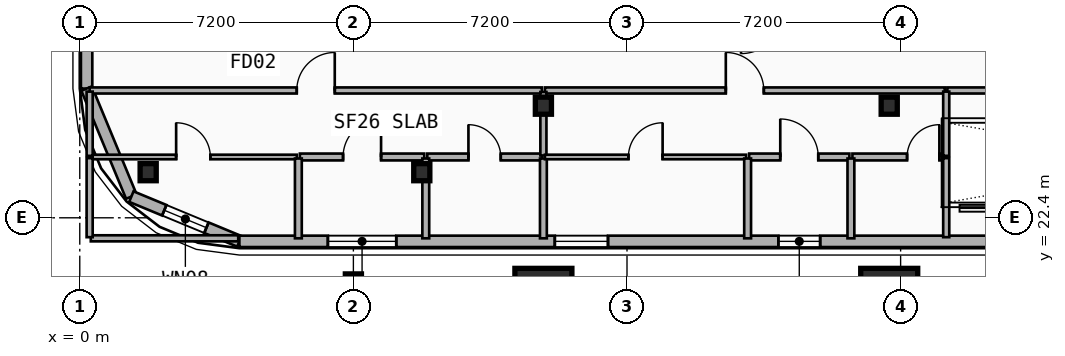
"""IFC4 building model, lengths in metres.
Left out: names, types, materials, properties, quantities, classifications, styles, units other than length and angle.
Written with IfcOpenShell. Run it as: python <this file> out.ifc"""

import sys

from ifc_helpers import new_model, si_unit, direction, frame, frame_2d, origin, origin_2d, place, context, subcontext, project, spatial, rectangle, i_section, extrude, element, fill, save


model = new_model("IFC4")
c1 = context("Model", 3, precision=1e-05, world=origin(), true_north=direction((0.0, 1.0)))
c2 = subcontext(c1, "Body", "Model", "MODEL_VIEW")
j1 = project(units=[si_unit("LENGTHUNIT", "METRE"), si_unit("PLANEANGLEUNIT", "RADIAN")], contexts=[c1])
p1 = place(None, origin())
s1 = spatial("IfcSite", under=j1, at=p1, CompositionType="ELEMENT")
p2 = place(p1, origin())
s2 = spatial("IfcBuilding", under=s1, at=p2, CompositionType="ELEMENT")
p3 = place(p2, frame((0.0, 0.0, 64.0)))
s3 = spatial("IfcBuildingStorey", under=s2, at=p3, CompositionType="ELEMENT", Elevation=64.0)
for number, where, z_axis, x_axis in (
    (1, (12.2, 25.35, 0.0), (0.0, 0.0, 1.0), (1.0, 0.0, 0.0)),
    (2, (21.3, 25.35, 0.0), (0.0, 0.0, 1.0), (1.0, 0.0, 0.0)),
):
    element("IfcColumn", number, at=place(p3, frame(where, z_axis=z_axis, x_axis=x_axis)), inside=s3, PredefinedType="COLUMN", context=c2, shape_type="SweptSolid", body=[
        extrude(i_section(OverallWidth=0.424, OverallDepth=0.45, WebThickness=0.041, FlangeThickness=0.065, FilletRadius=0.015, at=origin_2d()), origin(), (0.0, 0.0, 1.0), 3.5),
    ])
for number, where, z_axis, x_axis in (
    (3, (12.2, 20.428, 0.0), (0.0, -0.09, 0.996), (1.0, 0.0, 0.0)),
    (4, (21.3, 20.428, 0.0), (0.0, -0.09, 0.996), (1.0, 0.0, 0.0)),
):
    element("IfcColumn", number, at=place(p3, frame(where, z_axis=z_axis, x_axis=x_axis)), inside=s3, PredefinedType="COLUMN", context=c2, shape_type="SweptSolid", body=[
        extrude(rectangle(XDim=1.5, YDim=1.5, at=origin_2d()), origin(), (0.0, 0.0, 1.0), 3.514),
    ])
for number, where, z_axis, x_axis in (
    (5, (9.0, 23.6, 0.0), (0.0, 0.0, 1.0), (1.0, 0.0, 0.0)),
    (6, (1.8, 23.6, 0.0), (0.0, 0.0, 1.0), (1.0, 0.0, 0.0)),
):
    element("IfcColumn", number, at=place(p3, frame(where, z_axis=z_axis, x_axis=x_axis)), inside=s3, PredefinedType="COLUMN", context=c2, shape_type="SweptSolid", body=[
        extrude(i_section(OverallWidth=0.424, OverallDepth=0.45, WebThickness=0.041, FlangeThickness=0.065, FilletRadius=0.015, at=origin_2d()), origin(), (0.0, 0.0, 1.0), 3.5),
    ])
p4 = place(p3, frame((7.2, 20.795, 0.0), z_axis=(0.0, -0.079891690793, 0.996803550226), x_axis=(1.0, 0.0, 0.0)))
e7 = element("IfcColumn", 7, at=p4, inside=s3, PredefinedType="COLUMN", context=c2, shape_type="SweptSolid", body=[
    extrude(i_section(OverallWidth=0.424, OverallDepth=0.45, WebThickness=0.041, FlangeThickness=0.065, FilletRadius=0.015, at=origin_2d()), origin(), (0.0, 0.0, 1.0), 3.511),
])
p5 = place(p3, frame((0.18, 25.8, 0.0), z_axis=(0.0, 0.0, 1.0), x_axis=(0.0, 1.0, 0.0)))
e8 = element("IfcWall", 8, at=p5, inside=s3, PredefinedType="SOLIDWALL", context=c2, shape_type="SweptSolid", body=[
    extrude(rectangle(XDim=15.2, YDim=0.3, at=frame_2d((7.6, 0.0))), origin(), (0.0, 0.0, 1.0), 3.24),
])
p6 = place(p5, frame((2.86, 0.0, 0.48)))
e9 = element("IfcOpeningElement", 9, at=p6, cuts=e8, PredefinedType="OPENING", context=c2, shape_type="SweptSolid", body=[
    extrude(rectangle(XDim=1.4, YDim=1.8, at=frame_2d((0.7, 0.9))), frame((0.0, 0.16, 0.0), z_axis=(0.0, -1.0, 0.0), x_axis=(1.0, 0.0, 0.0)), (0.0, 0.0, 1.0), 0.32),
])
p7 = place(p5, frame((5.019, 0.0, 0.48)))
e10 = element("IfcOpeningElement", 10, at=p7, cuts=e8, PredefinedType="OPENING", context=c2, shape_type="SweptSolid", body=[
    extrude(rectangle(XDim=1.4, YDim=1.8, at=frame_2d((0.7, 0.9))), frame((0.0, 0.16, 0.0), z_axis=(0.0, -1.0, 0.0), x_axis=(1.0, 0.0, 0.0)), (0.0, 0.0, 1.0), 0.32),
])
p8 = place(p5, frame((8.186, 0.0, 0.48)))
e11 = element("IfcOpeningElement", 11, at=p8, cuts=e8, PredefinedType="OPENING", context=c2, shape_type="SweptSolid", body=[
    extrude(rectangle(XDim=1.4, YDim=1.8, at=frame_2d((0.7, 0.9))), frame((0.0, 0.16, 0.0), z_axis=(0.0, -1.0, 0.0), x_axis=(1.0, 0.0, 0.0)), (0.0, 0.0, 1.0), 0.32),
])
p9 = place(p5, frame((9.993, 0.0, 0.48)))
e12 = element("IfcOpeningElement", 12, at=p9, cuts=e8, PredefinedType="OPENING", context=c2, shape_type="SweptSolid", body=[
    extrude(rectangle(XDim=1.4, YDim=1.8, at=frame_2d((0.7, 0.9))), frame((0.0, 0.16, 0.0), z_axis=(0.0, -1.0, 0.0), x_axis=(1.0, 0.0, 0.0)), (0.0, 0.0, 1.0), 0.32),
])
p10 = place(p3, frame((1.357, 22.958, 0.0), z_axis=(0.0, 0.0, 1.0), x_axis=(-0.382704529509, 0.923870793506, 0.0)))
e13 = element("IfcWall", 13, at=p10, inside=s3, PredefinedType="SOLIDWALL", context=c2, shape_type="SweptSolid", body=[
    extrude(rectangle(XDim=3.077, YDim=0.3, at=frame_2d((1.538, 0.0))), origin(), (0.0, 0.0, 1.0), 3.24),
])
p11 = place(p3, frame((4.2, 21.78, 0.0), z_axis=(0.0, 0.0, 1.0), x_axis=(-0.923870793506, 0.382704529509, 0.0)))
e14 = element("IfcWall", 14, at=p11, inside=s3, PredefinedType="SOLIDWALL", context=c2, shape_type="SweptSolid", body=[
    extrude(rectangle(XDim=3.077, YDim=0.3, at=frame_2d((1.538, 0.0))), origin(), (0.0, 0.0, 1.0), 3.24),
])
p12 = place(p11, frame((0.938, 0.0, 0.75)))
e15 = element("IfcOpeningElement", 15, at=p12, cuts=e14, PredefinedType="OPENING", context=c2, shape_type="SweptSolid", body=[
    extrude(rectangle(XDim=1.2, YDim=1.5, at=frame_2d((0.6, 0.75))), frame((0.0, 0.16, 0.0), z_axis=(0.0, -1.0, 0.0), x_axis=(1.0, 0.0, 0.0)), (0.0, 0.0, 1.0), 0.32),
])
p13 = place(p3, frame((53.4, 21.78, 0.0), z_axis=(0.0, 0.0, 1.0), x_axis=(-1.0, 0.0, 0.0)))
e16 = element("IfcWall", 16, at=p13, inside=s3, PredefinedType="SOLIDWALL", context=c2, shape_type="SweptSolid", body=[
    extrude(rectangle(XDim=49.2, YDim=0.3, at=frame_2d((24.6, 0.0))), origin(), (0.0, 0.0, 1.0), 2.72),
])
p14 = place(p13, frame((45.072, 0.0, 0.48)))
e17 = element("IfcOpeningElement", 17, at=p14, cuts=e16, PredefinedType="OPENING", context=c2, shape_type="SweptSolid", body=[
    extrude(rectangle(XDim=1.8, YDim=1.8, at=frame_2d((0.9, 0.9))), frame((0.0, 0.16, 0.0), z_axis=(0.0, -1.0, 0.0), x_axis=(1.0, 0.0, 0.0)), (0.0, 0.0, 1.0), 0.32),
])
p15 = place(p13, frame((39.5, 0.0, 0.34)))
e18 = element("IfcOpeningElement", 18, at=p15, cuts=e16, PredefinedType="OPENING", context=c2, shape_type="SweptSolid", body=[
    extrude(rectangle(XDim=1.4, YDim=1.8, at=frame_2d((0.7, 0.9))), frame((0.0, 0.16, 0.0), z_axis=(0.0, -1.0, 0.0), x_axis=(1.0, 0.0, 0.0)), (0.0, 0.0, 1.0), 0.32),
])
p16 = place(p13, frame((33.917, 0.0, 1.48)))
e19 = element("IfcOpeningElement", 19, at=p16, cuts=e16, PredefinedType="OPENING", context=c2, shape_type="SweptSolid", body=[
    extrude(rectangle(XDim=1.1, YDim=1.05, at=frame_2d((0.55, 0.525))), frame((0.0, 0.16, 0.0), z_axis=(0.0, -1.0, 0.0), x_axis=(1.0, 0.0, 0.0)), (0.0, 0.0, 1.0), 0.32),
])
p17 = place(p13, frame((16.5, 0.0, 0.34)))
e20 = element("IfcOpeningElement", 20, at=p17, cuts=e16, PredefinedType="OPENING", context=c2, shape_type="SweptSolid", body=[
    extrude(rectangle(XDim=1.8, YDim=1.8, at=frame_2d((0.9, 0.9))), frame((0.0, 0.16, 0.0), z_axis=(0.0, -1.0, 0.0), x_axis=(1.0, 0.0, 0.0)), (0.0, 0.0, 1.0), 0.32),
])
p18 = place(p13, frame((4.354, 0.0, 0.74)))
e21 = element("IfcOpeningElement", 21, at=p18, cuts=e16, PredefinedType="OPENING", context=c2, shape_type="SweptSolid", body=[
    extrude(rectangle(XDim=1.8, YDim=1.8, at=frame_2d((0.9, 0.9))), frame((0.0, 0.16, 0.0), z_axis=(0.0, -1.0, 0.0), x_axis=(1.0, 0.0, 0.0)), (0.0, 0.0, 1.0), 0.32),
])
p19 = place(p13, frame((0.364, 0.0, 0.74)))
e22 = element("IfcOpeningElement", 22, at=p19, cuts=e16, PredefinedType="OPENING", context=c2, shape_type="SweptSolid", body=[
    extrude(rectangle(XDim=1.8, YDim=1.8, at=frame_2d((0.9, 0.9))), frame((0.0, 0.16, 0.0), z_axis=(0.0, -1.0, 0.0), x_axis=(1.0, 0.0, 0.0)), (0.0, 0.0, 1.0), 0.32),
])
p20 = place(p3, frame((0.26, 25.75, 0.0), z_axis=(0.0, 0.0, 1.0), x_axis=(1.0, 0.0, 0.0)))
e23 = element("IfcWall", 23, at=p20, inside=s3, PredefinedType="PARTITIONING", context=c2, shape_type="SweptSolid", body=[
    extrude(rectangle(XDim=11.9, YDim=0.16, at=frame_2d((5.95, 0.0))), origin(), (0.0, 0.0, 1.0), 2.31),
])
p21 = place(p20, frame((5.45, 0.0, 0.0)))
e24 = element("IfcOpeningElement", 24, at=p21, cuts=e23, PredefinedType="OPENING", context=c2, shape_type="SweptSolid", body=[
    extrude(rectangle(XDim=1.0, YDim=2.15, at=frame_2d((0.5, 1.075))), frame((0.0, 0.09, 0.0), z_axis=(0.0, -1.0, 0.0), x_axis=(1.0, 0.0, 0.0)), (0.0, 0.0, 1.0), 0.18),
])
p22 = place(p3, frame((12.24, 25.75, 0.0), z_axis=(0.0, 0.0, 1.0), x_axis=(1.0, 0.0, 0.0)))
e25 = element("IfcWall", 25, at=p22, inside=s3, PredefinedType="PARTITIONING", context=c2, shape_type="SweptSolid", body=[
    extrude(rectangle(XDim=10.52, YDim=0.16, at=frame_2d((5.26, 0.0))), origin(), (0.0, 0.0, 1.0), 2.31),
])
p23 = place(p22, frame((4.76, 0.0, 0.0)))
e26 = element("IfcOpeningElement", 26, at=p23, cuts=e25, PredefinedType="OPENING", context=c2, shape_type="SweptSolid", body=[
    extrude(rectangle(XDim=1.0, YDim=2.15, at=frame_2d((0.5, 1.075))), frame((0.0, 0.09, 0.0), z_axis=(0.0, -1.0, 0.0), x_axis=(1.0, 0.0, 0.0)), (0.0, 0.0, 1.0), 0.18),
])
p24 = place(p3, frame((0.26, 24.0, 0.0), z_axis=(0.0, 0.0, 1.0), x_axis=(1.0, 0.0, 0.0)))
e27 = element("IfcWall", 27, at=p24, inside=s3, PredefinedType="PARTITIONING", context=c2, shape_type="SweptSolid", body=[
    extrude(rectangle(XDim=5.452, YDim=0.12, at=frame_2d((2.726, 0.0))), origin(), (0.0, 0.0, 1.0), 2.57),
])
p25 = place(p24, frame((2.276, 0.0, 0.0)))
e28 = element("IfcOpeningElement", 28, at=p25, cuts=e27, PredefinedType="OPENING", context=c2, shape_type="SweptSolid", body=[
    extrude(rectangle(XDim=0.9, YDim=2.1, at=frame_2d((0.45, 1.05))), frame((0.0, 0.07, 0.0), z_axis=(0.0, -1.0, 0.0), x_axis=(1.0, 0.0, 0.0)), (0.0, 0.0, 1.0), 0.14),
])
p26 = place(p3, frame((5.792, 24.0, 0.0), z_axis=(0.0, 0.0, 1.0), x_axis=(1.0, 0.0, 0.0)))
e29 = element("IfcWall", 29, at=p26, inside=s3, PredefinedType="PLUMBINGWALL", context=c2, shape_type="SweptSolid", body=[
    extrude(rectangle(XDim=3.273, YDim=0.18, at=frame_2d((1.636, 0.0))), origin(), (0.0, 0.0, 1.0), 2.57),
])
p27 = place(p26, frame((1.136, 0.0, 0.0)))
e30 = element("IfcOpeningElement", 30, at=p27, cuts=e29, PredefinedType="OPENING", context=c2, shape_type="SweptSolid", body=[
    extrude(rectangle(XDim=1.0, YDim=2.15, at=frame_2d((0.5, 1.075))), frame((0.0, 0.1, 0.0), z_axis=(0.0, -1.0, 0.0), x_axis=(1.0, 0.0, 0.0)), (0.0, 0.0, 1.0), 0.2),
])
p28 = place(p3, frame((9.145, 24.0, 0.0), z_axis=(0.0, 0.0, 1.0), x_axis=(1.0, 0.0, 0.0)))
e31 = element("IfcWall", 31, at=p28, inside=s3, PredefinedType="PLUMBINGWALL", context=c2, shape_type="SweptSolid", body=[
    extrude(rectangle(XDim=3.015, YDim=0.18, at=frame_2d((1.507, 0.0))), origin(), (0.0, 0.0, 1.0), 2.31),
])
p29 = place(p28, frame((1.083, 0.0, 0.0)))
e32 = element("IfcOpeningElement", 32, at=p29, cuts=e31, PredefinedType="OPENING", context=c2, shape_type="SweptSolid", body=[
    extrude(rectangle(XDim=0.85, YDim=2.1, at=frame_2d((0.425, 1.05))), frame((0.0, 0.1, 0.0), z_axis=(0.0, -1.0, 0.0), x_axis=(1.0, 0.0, 0.0)), (0.0, 0.0, 1.0), 0.2),
])
p30 = place(p3, frame((12.2, 24.04, 0.0), z_axis=(0.0, 0.0, 1.0), x_axis=(0.0, 1.0, 0.0)))
e33 = element("IfcWall", 33, at=p30, inside=s3, PredefinedType="PARTITIONING", context=c2, shape_type="SweptSolid", body=[
    extrude(rectangle(XDim=1.67, YDim=0.16, at=frame_2d((0.835, 0.0))), origin(), (0.0, 0.0, 1.0), 2.31),
])
for number, where, z_axis, x_axis in (
    (34, (5.752, 21.86, 0.0), (0.0, 0.0, 1.0), (0.0, 1.0, 0.0)),
    (35, (9.105, 21.86, 0.0), (0.0, 0.0, 1.0), (0.0, 1.0, 0.0)),
):
    element("IfcWall", number, at=place(p3, frame(where, z_axis=z_axis, x_axis=x_axis)), inside=s3, PredefinedType="PLUMBINGWALL", context=c2, shape_type="SweptSolid", body=[
        extrude(rectangle(XDim=2.1, YDim=0.18, at=frame_2d((1.05, 0.0))), origin(), (0.0, 0.0, 1.0), 2.72),
    ])
p31 = place(p3, frame((12.2, 21.86, 0.0), z_axis=(0.0, 0.0, 1.0), x_axis=(0.0, 1.0, 0.0)))
e36 = element("IfcWall", 36, at=p31, inside=s3, PredefinedType="PLUMBINGWALL", context=c2, shape_type="SweptSolid", body=[
    extrude(rectangle(XDim=2.1, YDim=0.18, at=frame_2d((1.05, 0.0))), origin(), (0.0, 0.0, 1.0), 2.31),
])
p32 = place(p3, frame((12.24, 24.0, 0.0), z_axis=(0.0, 0.0, 1.0), x_axis=(1.0, 0.0, 0.0)))
e37 = element("IfcWall", 37, at=p32, inside=s3, PredefinedType="PARTITIONING", context=c2, shape_type="SweptSolid", body=[
    extrude(rectangle(XDim=5.294, YDim=0.12, at=frame_2d((2.647, 0.0))), origin(), (0.0, 0.0, 1.0), 2.31),
])
p33 = place(p32, frame((2.197, 0.0, 0.0)))
e38 = element("IfcOpeningElement", 38, at=p33, cuts=e37, PredefinedType="OPENING", context=c2, shape_type="SweptSolid", body=[
    extrude(rectangle(XDim=0.9, YDim=2.1, at=frame_2d((0.45, 1.05))), frame((0.0, 0.07, 0.0), z_axis=(0.0, -1.0, 0.0), x_axis=(1.0, 0.0, 0.0)), (0.0, 0.0, 1.0), 0.14),
])
p34 = place(p3, frame((17.614, 24.0, 0.0), z_axis=(0.0, 0.0, 1.0), x_axis=(1.0, 0.0, 0.0)))
e39 = element("IfcWall", 39, at=p34, inside=s3, PredefinedType="PLUMBINGWALL", context=c2, shape_type="SweptSolid", body=[
    extrude(rectangle(XDim=2.638, YDim=0.18, at=frame_2d((1.319, 0.0))), origin(), (0.0, 0.0, 1.0), 3.24),
])
p35 = place(p34, frame((0.819, 0.0, 0.0)))
e40 = element("IfcOpeningElement", 40, at=p35, cuts=e39, PredefinedType="OPENING", context=c2, shape_type="SweptSolid", body=[
    extrude(rectangle(XDim=1.0, YDim=2.15, at=frame_2d((0.5, 1.075))), frame((0.0, 0.1, 0.0), z_axis=(0.0, -1.0, 0.0), x_axis=(1.0, 0.0, 0.0)), (0.0, 0.0, 1.0), 0.2),
])
p36 = place(p3, frame((20.332, 24.0, 0.0), z_axis=(0.0, 0.0, 1.0), x_axis=(1.0, 0.0, 0.0)))
e41 = element("IfcWall", 41, at=p36, inside=s3, PredefinedType="PLUMBINGWALL", context=c2, shape_type="SweptSolid", body=[
    extrude(rectangle(XDim=2.428, YDim=0.18, at=frame_2d((1.214, 0.0))), origin(), (0.0, 0.0, 1.0), 2.31),
])
p37 = place(p36, frame((1.438, 0.0, 0.0)))
e42 = element("IfcOpeningElement", 42, at=p37, cuts=e41, PredefinedType="OPENING", context=c2, shape_type="SweptSolid", body=[
    extrude(rectangle(XDim=0.85, YDim=2.1, at=frame_2d((0.425, 1.05))), frame((0.0, 0.1, 0.0), z_axis=(0.0, -1.0, 0.0), x_axis=(1.0, 0.0, 0.0)), (0.0, 0.0, 1.0), 0.2),
])
for number, where, z_axis, x_axis in (
    (43, (17.574, 21.86, 0.0), (0.0, 0.0, 1.0), (0.0, 1.0, 0.0)),
    (44, (20.292, 21.86, 0.0), (0.0, 0.0, 1.0), (0.0, 1.0, 0.0)),
):
    element("IfcWall", number, at=place(p3, frame(where, z_axis=z_axis, x_axis=x_axis)), inside=s3, PredefinedType="PLUMBINGWALL", context=c2, shape_type="SweptSolid", body=[
        extrude(rectangle(XDim=2.1, YDim=0.18, at=frame_2d((1.05, 0.0))), origin(), (0.0, 0.0, 1.0), 2.82),
    ])
p38 = place(p3, frame((22.83, 25.75, 0.0), z_axis=(0.0, 0.0, 1.0), x_axis=(1.0, 0.0, 0.0)))
e45 = element("IfcWall", 45, at=p38, inside=s3, PredefinedType="PARTITIONING", context=c2, shape_type="SweptSolid", body=[
    extrude(rectangle(XDim=11.94, YDim=0.16, at=frame_2d((5.97, 0.0))), origin(), (0.0, 0.0, 1.0), 3.24),
])
p39 = place(p3, frame((0.26, 24.03, 0.0), z_axis=(0.0, 0.0, 1.0), x_axis=(0.0, 1.0, 0.0)))
e46 = element("IfcWall", 46, at=p39, inside=s3, PredefinedType="PARTITIONING", context=c2, shape_type="SweptSolid", body=[
    extrude(rectangle(XDim=1.69, YDim=0.16, at=frame_2d((0.845, 0.0))), origin(), (0.0, 0.0, 1.0), 3.24),
])
p40 = place(p3, frame((0.29, 21.86, 0.0), z_axis=(0.0, 0.0, 1.0), x_axis=(1.0, 0.0, 0.0)))
e47 = element("IfcWall", 47, at=p40, inside=s3, PredefinedType="PARTITIONING", context=c2, shape_type="SweptSolid", body=[
    extrude(rectangle(XDim=3.88, YDim=0.16, at=frame_2d((1.94, 0.0))), origin(), (0.0, 0.0, 1.0), 2.72),
])
p41 = place(p3, frame((0.26, 21.89, 0.0), z_axis=(0.0, 0.0, 1.0), x_axis=(0.0, 1.0, 0.0)))
e48 = element("IfcWall", 48, at=p41, inside=s3, PredefinedType="PARTITIONING", context=c2, shape_type="SweptSolid", body=[
    extrude(rectangle(XDim=2.08, YDim=0.16, at=frame_2d((1.04, 0.0))), origin(), (0.0, 0.0, 1.0), 3.24),
])
p42 = place(p3, frame((22.8, 24.03, 0.0), z_axis=(0.0, 0.0, 1.0), x_axis=(0.0, 1.0, 0.0)))
e49 = element("IfcWall", 49, at=p42, inside=s3, PredefinedType="PARTITIONING", context=c2, shape_type="SweptSolid", body=[
    extrude(rectangle(XDim=1.69, YDim=0.16, at=frame_2d((0.845, 0.0))), origin(), (0.0, 0.0, 1.0), 3.24),
])
p43 = place(p3, frame((22.8, 21.89, 0.0), z_axis=(0.0, 0.0, 1.0), x_axis=(0.0, 1.0, 0.0)))
e50 = element("IfcWall", 50, at=p43, inside=s3, PredefinedType="PARTITIONING", context=c2, shape_type="SweptSolid", body=[
    extrude(rectangle(XDim=2.08, YDim=0.16, at=frame_2d((1.04, 0.0))), origin(), (0.0, 0.0, 1.0), 2.68),
])
p44 = place(p14, origin())
e51 = element("IfcWindow", 51, at=p44, inside=s3, PartitioningType="SINGLE_PANEL", PredefinedType="WINDOW", context=c2, shape_type="SweptSolid", body=[
    extrude(rectangle(XDim=1.8, YDim=1.8, at=frame_2d((0.9, 0.9))), frame((0.0, 0.03, 0.0), z_axis=(0.0, -1.0, 0.0), x_axis=(1.0, 0.0, 0.0)), (0.0, 0.0, 1.0), 0.06),
])
fill(e17, e51)
p45 = place(p15, origin())
e52 = element("IfcWindow", 52, at=p45, inside=s3, PartitioningType="SINGLE_PANEL", PredefinedType="WINDOW", context=c2, shape_type="SweptSolid", body=[
    extrude(rectangle(XDim=1.4, YDim=1.8, at=frame_2d((0.7, 0.9))), frame((0.0, 0.03, 0.0), z_axis=(0.0, -1.0, 0.0), x_axis=(1.0, 0.0, 0.0)), (0.0, 0.0, 1.0), 0.06),
])
fill(e18, e52)
p46 = place(p16, origin())
e53 = element("IfcWindow", 53, at=p46, inside=s3, PartitioningType="SINGLE_PANEL", PredefinedType="WINDOW", context=c2, shape_type="SweptSolid", body=[
    extrude(rectangle(XDim=1.1, YDim=1.05, at=frame_2d((0.55, 0.525))), frame((0.0, 0.03, 0.0), z_axis=(0.0, -1.0, 0.0), x_axis=(1.0, 0.0, 0.0)), (0.0, 0.0, 1.0), 0.06),
])
fill(e19, e53)
p47 = place(p12, origin())
e54 = element("IfcWindow", 54, at=p47, inside=s3, PartitioningType="SINGLE_PANEL", PredefinedType="WINDOW", context=c2, shape_type="SweptSolid", body=[
    extrude(rectangle(XDim=1.2, YDim=1.5, at=frame_2d((0.6, 0.75))), frame((0.0, 0.03, 0.0), z_axis=(0.0, -1.0, 0.0), x_axis=(1.0, 0.0, 0.0)), (0.0, 0.0, 1.0), 0.06),
])
fill(e15, e54)
p48 = place(p21, origin())
e55 = element("IfcDoor", 55, at=p48, inside=s3, OperationType="SINGLE_SWING_RIGHT", PredefinedType="DOOR", context=c2, shape_type="SweptSolid", body=[
    extrude(rectangle(XDim=1.0, YDim=2.15, at=frame_2d((0.5, 1.075))), frame((0.0, 0.025, 0.0), z_axis=(0.0, -1.0, 0.0), x_axis=(1.0, 0.0, 0.0)), (0.0, 0.0, 1.0), 0.05),
])
fill(e24, e55)
p49 = place(p23, origin())
e56 = element("IfcDoor", 56, at=p49, inside=s3, OperationType="SINGLE_SWING_LEFT", PredefinedType="DOOR", context=c2, shape_type="SweptSolid", body=[
    extrude(rectangle(XDim=1.0, YDim=2.15, at=frame_2d((0.5, 1.075))), frame((0.0, 0.025, 0.0), z_axis=(0.0, -1.0, 0.0), x_axis=(1.0, 0.0, 0.0)), (0.0, 0.0, 1.0), 0.05),
])
fill(e26, e56)
p50 = place(p25, origin())
e57 = element("IfcDoor", 57, at=p50, inside=s3, OperationType="SINGLE_SWING_LEFT", PredefinedType="DOOR", context=c2, shape_type="SweptSolid", body=[
    extrude(rectangle(XDim=0.9, YDim=2.1, at=frame_2d((0.45, 1.05))), frame((0.0, 0.025, 0.0), z_axis=(0.0, -1.0, 0.0), x_axis=(1.0, 0.0, 0.0)), (0.0, 0.0, 1.0), 0.05),
])
fill(e28, e57)
p51 = place(p27, origin())
e58 = element("IfcDoor", 58, at=p51, inside=s3, OperationType="SINGLE_SWING_RIGHT", PredefinedType="DOOR", context=c2, shape_type="SweptSolid", body=[
    extrude(rectangle(XDim=1.0, YDim=2.15, at=frame_2d((0.5, 1.075))), frame((0.0, 0.025, 0.0), z_axis=(0.0, -1.0, 0.0), x_axis=(1.0, 0.0, 0.0)), (0.0, 0.0, 1.0), 0.05),
])
fill(e30, e58)
p52 = place(p29, origin())
e59 = element("IfcDoor", 59, at=p52, inside=s3, OperationType="SINGLE_SWING_LEFT", PredefinedType="DOOR", context=c2, shape_type="SweptSolid", body=[
    extrude(rectangle(XDim=0.85, YDim=2.1, at=frame_2d((0.425, 1.05))), frame((0.0, 0.025, 0.0), z_axis=(0.0, -1.0, 0.0), x_axis=(1.0, 0.0, 0.0)), (0.0, 0.0, 1.0), 0.05),
])
fill(e32, e59)
p53 = place(p33, origin())
e60 = element("IfcDoor", 60, at=p53, inside=s3, OperationType="SINGLE_SWING_RIGHT", PredefinedType="DOOR", context=c2, shape_type="SweptSolid", body=[
    extrude(rectangle(XDim=0.9, YDim=2.1, at=frame_2d((0.45, 1.05))), frame((0.0, 0.025, 0.0), z_axis=(0.0, -1.0, 0.0), x_axis=(1.0, 0.0, 0.0)), (0.0, 0.0, 1.0), 0.05),
])
fill(e38, e60)
p54 = place(p35, origin())
e61 = element("IfcDoor", 61, at=p54, inside=s3, OperationType="SINGLE_SWING_LEFT", PredefinedType="DOOR", context=c2, shape_type="SweptSolid", body=[
    extrude(rectangle(XDim=1.0, YDim=2.15, at=frame_2d((0.5, 1.075))), frame((0.0, 0.025, 0.0), z_axis=(0.0, -1.0, 0.0), x_axis=(1.0, 0.0, 0.0)), (0.0, 0.0, 1.0), 0.05),
])
fill(e40, e61)
p55 = place(p37, origin())
e62 = element("IfcDoor", 62, at=p55, inside=s3, OperationType="SINGLE_SWING_RIGHT", PredefinedType="DOOR", context=c2, shape_type="SweptSolid", body=[
    extrude(rectangle(XDim=0.85, YDim=2.1, at=frame_2d((0.425, 1.05))), frame((0.0, 0.025, 0.0), z_axis=(0.0, -1.0, 0.0), x_axis=(1.0, 0.0, 0.0)), (0.0, 0.0, 1.0), 0.05),
])
fill(e42, e62)
save(model, sys.argv[1])
